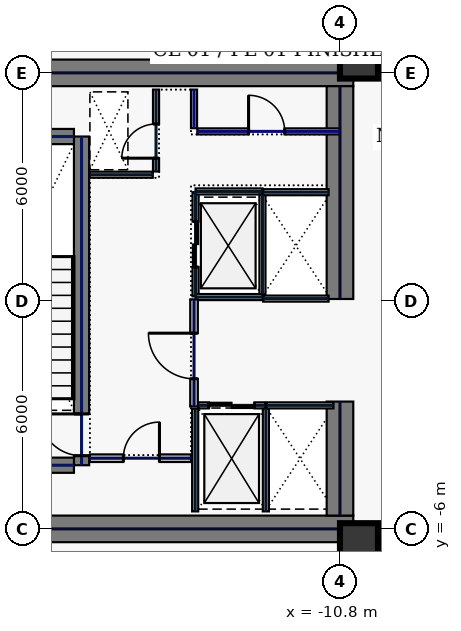
"""IFC4 building model, lengths in metres.
Left out: names, types, materials, properties, quantities, classifications, styles, units other than length and angle.
Written with IfcOpenShell. Run it as: python <this file> out.ifc"""

import sys

from ifc_helpers import new_model, si_unit, direction, frame, frame_2d, origin, origin_2d, place, context, subcontext, project, spatial, rectangle, hollow_rectangle, extrude, element, fill, save


model = new_model("IFC4")
c1 = context("Model", 3, precision=1e-05, world=origin(), true_north=direction((0.0, 1.0)))
c2 = subcontext(c1, "Body", "Model", "MODEL_VIEW")
j1 = project(units=[si_unit("LENGTHUNIT", "METRE"), si_unit("PLANEANGLEUNIT", "RADIAN")], contexts=[c1])
p1 = place(None, origin())
s1 = spatial("IfcSite", under=j1, at=p1, CompositionType="ELEMENT")
p2 = place(p1, origin())
s2 = spatial("IfcBuilding", under=s1, at=p2, CompositionType="ELEMENT")
p3 = place(p2, frame((0.0, 0.0, 105.4)))
s3 = spatial("IfcBuildingStorey", under=s2, at=p3, CompositionType="ELEMENT", Elevation=105.4)
for number, where, z_axis, x_axis in (
    (1, (-22.0, 6.0, 0.0), (0.0, 0.0, 1.0), (1.0, 0.0, 0.0)),
    (2, (-22.0, -6.0, 0.0), (0.0, 0.0, 1.0), (1.0, 0.0, 0.0)),
):
    element("IfcWall", number, at=place(p3, frame(where, z_axis=z_axis, x_axis=x_axis)), inside=s3, PredefinedType="SHEAR", context=c2, shape_type="SweptSolid", body=[
        extrude(rectangle(XDim=11.55, YDim=0.7, at=frame_2d((5.775, 0.0))), origin(), (0.0, 0.0, 1.0), 3.74),
    ])
p4 = place(p3, frame((-10.8, -5.65, 0.0), z_axis=(0.0, 0.0, 1.0), x_axis=(0.0, 1.0, 0.0)))
e3 = element("IfcWall", 3, at=p4, inside=s3, PredefinedType="SHEAR", context=c2, shape_type="SweptSolid", body=[
    extrude(rectangle(XDim=3.0, YDim=0.7, at=frame_2d((1.5, 0.0))), origin(), (0.0, 0.0, 1.0), 3.74),
])
p5 = place(p3, frame((-10.8, 0.05, 0.0), z_axis=(0.0, 0.0, 1.0), x_axis=(0.0, 1.0, 0.0)))
e4 = element("IfcWall", 4, at=p5, inside=s3, PredefinedType="SHEAR", context=c2, shape_type="SweptSolid", body=[
    extrude(rectangle(XDim=5.6, YDim=0.7, at=frame_2d((2.8, 0.0))), origin(), (0.0, 0.0, 1.0), 3.74),
])
p6 = place(p3, frame((-17.6, -4.325, 0.0), z_axis=(0.0, 0.0, 1.0), x_axis=(0.0, 1.0, 0.0)))
e5 = element("IfcWall", 5, at=p6, inside=s3, PredefinedType="SHEAR", context=c2, shape_type="SweptSolid", body=[
    extrude(rectangle(XDim=8.65, YDim=0.4, at=frame_2d((4.325, 0.0))), origin(), (0.0, 0.0, 1.0), 3.74),
])
p7 = place(p6, frame((0.25, 0.0, 0.0)))
e6 = element("IfcOpeningElement", 6, at=p7, cuts=e5, PredefinedType="OPENING", context=c2, shape_type="SweptSolid", body=[
    extrude(rectangle(XDim=1.1, YDim=2.2, at=frame_2d((0.55, 1.1))), frame((0.0, 0.21, 0.0), z_axis=(0.0, -1.0, 0.0), x_axis=(1.0, 0.0, 0.0)), (0.0, 0.0, 1.0), 0.42),
])
for number, where, z_axis, x_axis in (
    (7, (-21.2, -4.325, 0.0), (0.0, 0.0, 1.0), (1.0, 0.0, 0.0)),
    (8, (-21.2, 4.325, 0.0), (0.0, 0.0, 1.0), (1.0, 0.0, 0.0)),
):
    element("IfcWall", number, at=place(p3, frame(where, z_axis=z_axis, x_axis=x_axis)), inside=s3, PredefinedType="SHEAR", context=c2, shape_type="SweptSolid", body=[
        extrude(rectangle(XDim=3.4, YDim=0.4, at=frame_2d((1.7, 0.0))), origin(), (0.0, 0.0, 1.0), 3.74),
    ])
for number, where, z_axis, x_axis in (
    (9, (-10.3, -6.35, 0.0), (0.0, 0.0, 1.0), (1.0, 0.0, 0.0)),
    (10, (-10.3, 6.35, 0.0), (0.0, 0.0, 1.0), (1.0, 0.0, 0.0)),
):
    element("IfcColumn", number, at=place(p3, frame(where, z_axis=z_axis, x_axis=x_axis)), inside=s3, PredefinedType="COLUMN", context=c2, shape_type="SweptSolid", body=[
        extrude(hollow_rectangle(XDim=1.0, YDim=1.0, WallThickness=0.045, at=origin_2d()), origin(), (0.0, 0.0, 1.0), 3.74),
    ])
p8 = place(p3, frame((-14.6, 0.12, 0.0), z_axis=(0.0, 0.0, 1.0), x_axis=(0.0, 1.0, 0.0)))
e11 = element("IfcWall", 11, at=p8, inside=s3, PredefinedType="PARTITIONING", context=c2, shape_type="SweptSolid", body=[
    extrude(rectangle(XDim=2.74, YDim=0.16, at=frame_2d((1.37, 0.0))), origin(), (0.0, 0.0, 1.0), 3.74),
])
p9 = place(p8, frame((0.77, 0.0, 0.0)))
e12 = element("IfcOpeningElement", 12, at=p9, cuts=e11, PredefinedType="OPENING", context=c2, shape_type="SweptSolid", body=[
    extrude(rectangle(XDim=1.2, YDim=2.2, at=frame_2d((0.6, 1.1))), frame((0.0, 0.09, 0.0), z_axis=(0.0, -1.0, 0.0), x_axis=(1.0, 0.0, 0.0)), (0.0, 0.0, 1.0), 0.18),
])
for number, where, z_axis, x_axis in (
    (13, (-14.6, 0.1, 0.0), (0.0, 0.0, 1.0), (1.0, 0.0, 0.0)),
    (14, (-14.6, 2.88, 0.0), (0.0, 0.0, 1.0), (1.0, 0.0, 0.0)),
):
    element("IfcWall", number, at=place(p3, frame(where, z_axis=z_axis, x_axis=x_axis)), inside=s3, PredefinedType="PARTITIONING", context=c2, shape_type="SweptSolid", body=[
        extrude(rectangle(XDim=1.76, YDim=0.16, at=frame_2d((0.88, 0.0))), origin(), (0.0, 0.0, 1.0), 3.74),
    ])
p10 = place(p3, frame((-12.84, 0.18, 0.0), z_axis=(0.0, 0.0, 1.0), x_axis=(0.0, 1.0, 0.0)))
e15 = element("IfcWall", 15, at=p10, inside=s3, PredefinedType="PARTITIONING", context=c2, shape_type="SweptSolid", body=[
    extrude(rectangle(XDim=2.62, YDim=0.16, at=frame_2d((1.31, 0.0))), origin(), (0.0, 0.0, 1.0), 3.74),
])
p11 = place(p3, frame((-14.53, -2.75, 0.0), z_axis=(0.0, 0.0, 1.0), x_axis=(1.0, 0.0, 0.0)))
e16 = element("IfcWall", 16, at=p11, inside=s3, PredefinedType="PARTITIONING", context=c2, shape_type="SweptSolid", body=[
    extrude(rectangle(XDim=1.76, YDim=0.16, at=frame_2d((0.88, 0.0))), origin(), (0.0, 0.0, 1.0), 3.74),
])
p12 = place(p11, frame((0.28, 0.0, 0.0)))
e17 = element("IfcOpeningElement", 17, at=p12, cuts=e16, PredefinedType="OPENING", context=c2, shape_type="SweptSolid", body=[
    extrude(rectangle(XDim=1.2, YDim=2.2, at=frame_2d((0.6, 1.1))), frame((0.0, 0.09, 0.0), z_axis=(0.0, -1.0, 0.0), x_axis=(1.0, 0.0, 0.0)), (0.0, 0.0, 1.0), 0.18),
])
for number, where, z_axis, x_axis in (
    (18, (-12.75, -5.54, 0.0), (0.0, 0.0, 1.0), (0.0, 1.0, 0.0)),
    (19, (-14.61, -5.54, 0.0), (0.0, 0.0, 1.0), (0.0, 1.0, 0.0)),
):
    element("IfcWall", number, at=place(p3, frame(where, z_axis=z_axis, x_axis=x_axis)), inside=s3, PredefinedType="PARTITIONING", context=c2, shape_type="SweptSolid", body=[
        extrude(rectangle(XDim=2.7, YDim=0.16, at=frame_2d((1.35, 0.0))), origin(), (0.0, 0.0, 1.0), 3.74),
    ])
p13 = place(p3, frame((-12.73, -2.75, 0.0), z_axis=(0.0, 0.0, 1.0), x_axis=(1.0, 0.0, 0.0)))
e20 = element("IfcWall", 20, at=p13, inside=s3, PredefinedType="PARTITIONING", context=c2, shape_type="SweptSolid", body=[
    extrude(rectangle(XDim=1.76, YDim=0.16, at=frame_2d((0.88, 0.0))), origin(), (0.0, 0.0, 1.0), 3.74),
])
for number, where, z_axis, x_axis in (
    (21, (-12.82, 0.06, 0.0), (0.0, 0.0, 1.0), (1.0, 0.0, 0.0)),
    (22, (-12.82, 2.86, 0.0), (0.0, 0.0, 1.0), (1.0, 0.0, 0.0)),
):
    element("IfcWall", number, at=place(p3, frame(where, z_axis=z_axis, x_axis=x_axis)), inside=s3, PredefinedType="PARTITIONING", context=c2, shape_type="SweptSolid", body=[
        extrude(rectangle(XDim=1.72, YDim=0.16, at=frame_2d((0.86, 0.0))), origin(), (0.0, 0.0, 1.0), 3.74),
    ])
p14 = place(p3, frame((-15.64, 3.405, 0.0), z_axis=(0.0, 0.0, 1.0), x_axis=(0.0, 1.0, 0.0)))
e23 = element("IfcWall", 23, at=p14, inside=s3, PredefinedType="PARTITIONING", context=c2, shape_type="SweptSolid", body=[
    extrude(rectangle(XDim=2.155, YDim=0.16, at=frame_2d((1.078, 0.0))), origin(), (0.0, 0.0, 1.0), 3.74),
])
p15 = place(p14, frame((0.35, 0.0, 0.0)))
e24 = element("IfcOpeningElement", 24, at=p15, cuts=e23, PredefinedType="OPENING", context=c2, shape_type="SweptSolid", body=[
    extrude(rectangle(XDim=0.9, YDim=2.2, at=frame_2d((0.45, 1.1))), frame((0.0, 0.09, 0.0), z_axis=(0.0, -1.0, 0.0), x_axis=(1.0, 0.0, 0.0)), (0.0, 0.0, 1.0), 0.18),
])
p16 = place(p3, frame((-17.38, 3.32, 0.0), z_axis=(0.0, 0.0, 1.0), x_axis=(1.0, 0.0, 0.0)))
e25 = element("IfcWall", 25, at=p16, inside=s3, PredefinedType="PARTITIONING", context=c2, shape_type="SweptSolid", body=[
    extrude(rectangle(XDim=1.655, YDim=0.16, at=frame_2d((0.827, 0.0))), origin(), (0.0, 0.0, 1.0), 3.74),
])
p17 = place(p3, frame((-17.38, -4.14, 0.0), z_axis=(0.0, 0.0, 1.0), x_axis=(1.0, 0.0, 0.0)))
e26 = element("IfcWall", 26, at=p17, inside=s3, PredefinedType="SOLIDWALL", context=c2, shape_type="SweptSolid", body=[
    extrude(rectangle(XDim=2.66, YDim=0.2, at=frame_2d((1.33, 0.0))), origin(), (0.0, 0.0, 1.0), 3.74),
])
p18 = place(p17, frame((0.88, 0.0, 0.0)))
e27 = element("IfcOpeningElement", 27, at=p18, cuts=e26, PredefinedType="OPENING", context=c2, shape_type="SweptSolid", body=[
    extrude(rectangle(XDim=0.95, YDim=2.2, at=frame_2d((0.475, 1.1))), frame((0.0, 0.11, 0.0), z_axis=(0.0, -1.0, 0.0), x_axis=(1.0, 0.0, 0.0)), (0.0, 0.0, 1.0), 0.22),
])
p19 = place(p3, frame((-14.555, 4.46, 0.0), z_axis=(0.0, 0.0, 1.0), x_axis=(1.0, 0.0, 0.0)))
e28 = element("IfcWall", 28, at=p19, inside=s3, PredefinedType="PARTITIONING", context=c2, shape_type="SweptSolid", body=[
    extrude(rectangle(XDim=3.755, YDim=0.16, at=frame_2d((1.877, 0.0))), origin(), (0.0, 0.0, 1.0), 3.74),
])
p20 = place(p19, frame((1.35, 0.0, 0.0)))
e29 = element("IfcOpeningElement", 29, at=p20, cuts=e28, PredefinedType="OPENING", context=c2, shape_type="SweptSolid", body=[
    extrude(rectangle(XDim=0.95, YDim=2.2, at=frame_2d((0.475, 1.1))), frame((0.0, 0.09, 0.0), z_axis=(0.0, -1.0, 0.0), x_axis=(1.0, 0.0, 0.0)), (0.0, 0.0, 1.0), 0.18),
])
p21 = place(p3, frame((-14.64, 4.545, 0.0), z_axis=(0.0, 0.0, 1.0), x_axis=(0.0, 1.0, 0.0)))
e30 = element("IfcWall", 30, at=p21, inside=s3, PredefinedType="PARTITIONING", context=c2, shape_type="SweptSolid", body=[
    extrude(rectangle(XDim=1.015, YDim=0.16, at=frame_2d((0.508, 0.0))), origin(), (0.0, 0.0, 1.0), 3.74),
])
p22 = place(p3, frame((-14.64, -2.78, 0.0), z_axis=(0.0, 0.0, 1.0), x_axis=(0.0, 1.0, 0.0)))
e31 = element("IfcWall", 31, at=p22, inside=s3, PredefinedType="SOLIDWALL", context=c2, shape_type="SweptSolid", body=[
    extrude(rectangle(XDim=2.82, YDim=0.2, at=frame_2d((1.41, 0.0))), origin(), (0.0, 0.0, 1.0), 3.74),
])
p23 = place(p22, frame((0.73, 0.0, 0.0)))
e32 = element("IfcOpeningElement", 32, at=p23, cuts=e31, PredefinedType="OPENING", context=c2, shape_type="SweptSolid", body=[
    extrude(rectangle(XDim=1.2, YDim=2.2, at=frame_2d((0.6, 1.1))), frame((0.0, 0.11, 0.0), z_axis=(0.0, -1.0, 0.0), x_axis=(1.0, 0.0, 0.0)), (0.0, 0.0, 1.0), 0.22),
])
p24 = place(p3, frame((-10.58, -7.785, 0.0), z_axis=(0.0, 0.0, 1.0), x_axis=(0.0, 1.0, 0.0)))
e33 = element("IfcWall", 33, at=p24, inside=s3, PredefinedType="PARTITIONING", context=c2, shape_type="SweptSolid", body=[
    extrude(rectangle(XDim=1.365, YDim=0.16, at=frame_2d((0.683, 0.0))), origin(), (0.0, 0.0, 1.0), 3.74),
])
p25 = place(p3, frame((-10.58, 6.42, 0.0), z_axis=(0.0, 0.0, 1.0), x_axis=(0.0, 1.0, 0.0)))
e34 = element("IfcWall", 34, at=p25, inside=s3, PredefinedType="PARTITIONING", context=c2, shape_type="SweptSolid", body=[
    extrude(rectangle(XDim=1.465, YDim=0.16, at=frame_2d((0.732, 0.0))), origin(), (0.0, 0.0, 1.0), 3.74),
])
p26 = place(p7, origin())
e35 = element("IfcDoor", 35, at=p26, inside=s3, OperationType="SINGLE_SWING_RIGHT", PredefinedType="DOOR", context=c2, shape_type="SweptSolid", body=[
    extrude(rectangle(XDim=1.1, YDim=2.2, at=frame_2d((0.55, 1.1))), frame((0.0, 0.025, 0.0), z_axis=(0.0, -1.0, 0.0), x_axis=(1.0, 0.0, 0.0)), (0.0, 0.0, 1.0), 0.05),
])
fill(e6, e35)
p27 = place(p9, origin())
e36 = element("IfcDoor", 36, at=p27, inside=s3, OperationType="SLIDING_TO_LEFT", PredefinedType="DOOR", context=c2, shape_type="SweptSolid", body=[
    extrude(rectangle(XDim=1.2, YDim=2.2, at=frame_2d((0.6, 1.1))), frame((0.0, 0.025, 0.0), z_axis=(0.0, -1.0, 0.0), x_axis=(1.0, 0.0, 0.0)), (0.0, 0.0, 1.0), 0.05),
])
fill(e12, e36)
p28 = place(p12, origin())
e37 = element("IfcDoor", 37, at=p28, inside=s3, OperationType="SLIDING_TO_LEFT", PredefinedType="DOOR", context=c2, shape_type="SweptSolid", body=[
    extrude(rectangle(XDim=1.2, YDim=2.2, at=frame_2d((0.6, 1.1))), frame((0.0, 0.025, 0.0), z_axis=(0.0, -1.0, 0.0), x_axis=(1.0, 0.0, 0.0)), (0.0, 0.0, 1.0), 0.05),
])
fill(e17, e37)
p29 = place(p15, origin())
e38 = element("IfcDoor", 38, at=p29, inside=s3, OperationType="SINGLE_SWING_LEFT", PredefinedType="DOOR", context=c2, shape_type="SweptSolid", body=[
    extrude(rectangle(XDim=0.9, YDim=2.2, at=frame_2d((0.45, 1.1))), frame((0.0, 0.025, 0.0), z_axis=(0.0, -1.0, 0.0), x_axis=(1.0, 0.0, 0.0)), (0.0, 0.0, 1.0), 0.05),
])
fill(e24, e38)
p30 = place(p18, origin())
e39 = element("IfcDoor", 39, at=p30, inside=s3, OperationType="SINGLE_SWING_RIGHT", PredefinedType="DOOR", context=c2, shape_type="SweptSolid", body=[
    extrude(rectangle(XDim=0.95, YDim=2.2, at=frame_2d((0.475, 1.1))), frame((0.0, 0.025, 0.0), z_axis=(0.0, -1.0, 0.0), x_axis=(1.0, 0.0, 0.0)), (0.0, 0.0, 1.0), 0.05),
])
fill(e27, e39)
p31 = place(p20, origin())
e40 = element("IfcDoor", 40, at=p31, inside=s3, OperationType="SINGLE_SWING_LEFT", PredefinedType="DOOR", context=c2, shape_type="SweptSolid", body=[
    extrude(rectangle(XDim=0.95, YDim=2.2, at=frame_2d((0.475, 1.1))), frame((0.0, 0.025, 0.0), z_axis=(0.0, -1.0, 0.0), x_axis=(1.0, 0.0, 0.0)), (0.0, 0.0, 1.0), 0.05),
])
fill(e29, e40)
p32 = place(p23, origin())
e41 = element("IfcDoor", 41, at=p32, inside=s3, OperationType="SINGLE_SWING_RIGHT", PredefinedType="DOOR", context=c2, shape_type="SweptSolid", body=[
    extrude(rectangle(XDim=1.2, YDim=2.2, at=frame_2d((0.6, 1.1))), frame((0.0, 0.025, 0.0), z_axis=(0.0, -1.0, 0.0), x_axis=(1.0, 0.0, 0.0)), (0.0, 0.0, 1.0), 0.05),
])
fill(e32, e41)
save(model, sys.argv[1])
